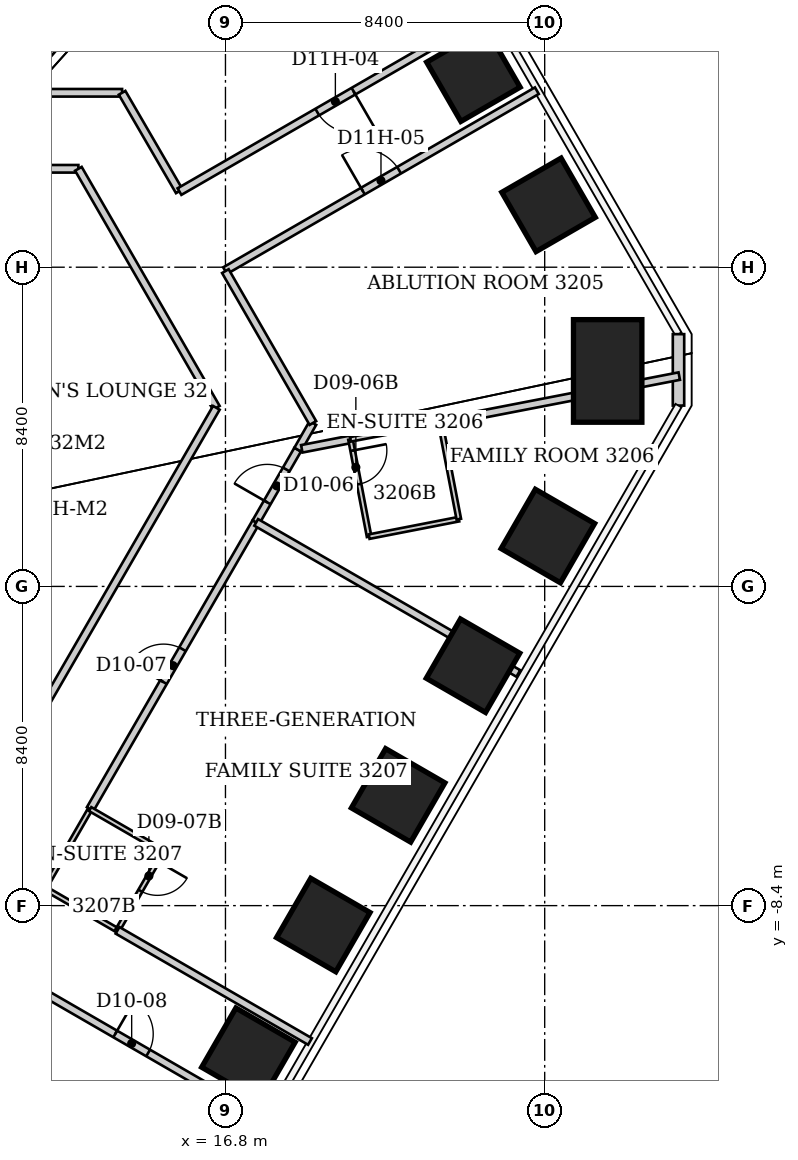
"""IFC4 building model, lengths in metres.
Left out: names, types, materials, properties, quantities, classifications, styles, units other than length and angle.
Written with IfcOpenShell. Run it as: python <this file> out.ifc"""

import sys

from ifc_helpers import new_model, si_unit, direction, frame, frame_2d, origin, origin_2d, place, context, subcontext, project, spatial, rectangle, extrude, element, fill, save


model = new_model("IFC4")
c1 = context("Model", 3, precision=1e-05, world=origin(), true_north=direction((0.0, 1.0)))
c2 = subcontext(c1, "Body", "Model", "MODEL_VIEW")
j1 = project(units=[si_unit("LENGTHUNIT", "METRE"), si_unit("PLANEANGLEUNIT", "RADIAN")], contexts=[c1])
p1 = place(None, origin())
s1 = spatial("IfcSite", under=j1, at=p1, CompositionType="ELEMENT")
p2 = place(p1, origin())
s2 = spatial("IfcBuilding", under=s1, at=p2, CompositionType="ELEMENT")
p3 = place(p2, frame((0.0, 0.0, 131.0)))
s3 = spatial("IfcBuildingStorey", under=s2, at=p3, CompositionType="ELEMENT", Elevation=131.0)
for number, where, z_axis, x_axis in (
    (1, (23.324, 13.466, 0.0), (0.0, 0.0, 1.0), (0.866, 0.5, 0.0)),
    (2, (25.302, 10.041, 0.0), (0.0, 0.0, 1.0), (0.866, 0.5, 0.0)),
):
    element("IfcColumn", number, at=place(p3, frame(where, z_axis=z_axis, x_axis=x_axis)), inside=s3, PredefinedType="COLUMN", context=c2, shape_type="SweptSolid", body=[
        extrude(rectangle(XDim=1.8, YDim=1.8, at=origin_2d()), origin(), (0.0, 0.0, 1.0), 3.8),
    ])
p4 = place(p3, frame((26.857, 5.67, 0.0), z_axis=(0.0, 0.0, 1.0), x_axis=(1.0, 0.0, 0.0)))
e3 = element("IfcColumn", 3, at=p4, inside=s3, PredefinedType="COLUMN", context=c2, shape_type="SweptSolid", body=[
    extrude(rectangle(XDim=1.8, YDim=2.7, at=origin_2d()), origin(), (0.0, 0.0, 1.0), 3.8),
])
for number, where, z_axis, x_axis in (
    (4, (25.284, 1.325, 0.0), (0.0, 0.0, 1.0), (0.866, -0.5, 0.0)),
    (5, (23.314, -2.087, 0.0), (0.0, 0.0, 1.0), (0.866, -0.5, 0.0)),
    (6, (21.344, -5.499, 0.0), (0.0, 0.0, 1.0), (0.866, -0.5, 0.0)),
    (7, (19.374, -8.911, 0.0), (0.0, 0.0, 1.0), (0.866, -0.5, 0.0)),
    (8, (17.404, -12.323, 0.0), (0.0, 0.0, 1.0), (0.866, -0.5, 0.0)),
):
    element("IfcColumn", number, at=place(p3, frame(where, z_axis=z_axis, x_axis=x_axis)), inside=s3, PredefinedType="COLUMN", context=c2, shape_type="SweptSolid", body=[
        extrude(rectangle(XDim=1.8, YDim=1.8, at=origin_2d()), origin(), (0.0, 0.0, 1.0), 3.8),
    ])
p5 = place(p3, frame((28.721, 6.638, 0.0), z_axis=(0.0, 0.0, 1.0), x_axis=(0.0, -1.0, 0.0)))
e9 = element("IfcWall", 9, at=p5, inside=s3, PredefinedType="SOLIDWALL", context=c2, shape_type="SweptSolid", body=[
    extrude(rectangle(XDim=1.88, YDim=0.3, at=frame_2d((0.94, 0.0))), origin(), (0.0, 0.0, 1.0), 3.64),
])
p6 = place(p3, frame((0.15, 10.99, 0.0), z_axis=(0.0, 0.0, 1.0), x_axis=(1.0, 0.0, 0.0)))
e10 = element("IfcWall", 10, at=p6, inside=s3, PredefinedType="PARTITIONING", context=c2, shape_type="SweptSolid", body=[
    extrude(rectangle(XDim=12.78, YDim=0.2, at=frame_2d((6.39, 0.0))), origin(), (0.0, 0.0, 1.0), 3.64),
])
p7 = place(p3, frame((10.84, -10.01, 0.0), z_axis=(0.0, 0.0, 1.0), x_axis=(0.86587701925, -0.500256921525, 0.0)))
e11 = element("IfcWall", 11, at=p7, inside=s3, PredefinedType="PARTITIONING", context=c2, shape_type="SweptSolid", body=[
    extrude(rectangle(XDim=8.066, YDim=0.2, at=frame_2d((4.033, 0.0))), origin(), (0.0, 0.0, 1.0), 3.64),
])
p8 = place(p7, frame((3.533, 0.0, 0.0)))
e12 = element("IfcOpeningElement", 12, at=p8, cuts=e11, PredefinedType="OPENING", context=c2, shape_type="SweptSolid", body=[
    extrude(rectangle(XDim=1.0, YDim=2.13, at=frame_2d((0.5, 1.065))), frame((0.0, 0.1, 0.0), z_axis=(0.0, -1.0, 0.0), x_axis=(1.0, 0.0, 0.0)), (0.0, 0.0, 1.0), 0.2),
])
p9 = place(p3, frame((12.04, -7.94, 0.0), z_axis=(0.0, 0.0, 1.0), x_axis=(0.499737123639, 0.866177122335, 0.0)))
e13 = element("IfcWall", 13, at=p9, inside=s3, PredefinedType="PARTITIONING", context=c2, shape_type="SweptSolid", body=[
    extrude(rectangle(XDim=2.401, YDim=0.12, at=frame_2d((1.201, 0.0))), origin(), (0.0, 0.0, 1.0), 3.64),
])
p10 = place(p3, frame((12.04, -7.94, 0.0), z_axis=(0.0, 0.0, 1.0), x_axis=(0.865705017107, -0.500554515868, 0.0)))
e14 = element("IfcWall", 14, at=p10, inside=s3, PredefinedType="PARTITIONING", context=c2, shape_type="SweptSolid", body=[
    extrude(rectangle(XDim=2.218, YDim=0.12, at=frame_2d((1.109, 0.0))), origin(), (0.0, 0.0, 1.0), 3.64),
])
p11 = place(p3, frame((12.93, 10.99, 0.0), z_axis=(0.0, 0.0, 1.0), x_axis=(0.4998524389, -0.866110581465, 0.0)))
e15 = element("IfcWall", 15, at=p11, inside=s3, PredefinedType="PARTITIONING", context=c2, shape_type="SweptSolid", body=[
    extrude(rectangle(XDim=7.262, YDim=0.2, at=frame_2d((3.631, 0.0))), origin(), (0.0, 0.0, 1.0), 3.64),
])
p12 = place(p3, frame((13.24, -5.86, 0.0), z_axis=(0.0, 0.0, 1.0), x_axis=(0.500093306236, 0.865971526701, 0.0)))
e16 = element("IfcWall", 16, at=p12, inside=s3, PredefinedType="PARTITIONING", context=c2, shape_type="SweptSolid", body=[
    extrude(rectangle(XDim=8.719, YDim=0.2, at=frame_2d((4.359, 0.0))), origin(), (0.0, 0.0, 1.0), 3.64),
])
p13 = place(p12, frame((3.859, 0.0, 0.0)))
e17 = element("IfcOpeningElement", 17, at=p13, cuts=e16, PredefinedType="OPENING", context=c2, shape_type="SweptSolid", body=[
    extrude(rectangle(XDim=1.0, YDim=2.13, at=frame_2d((0.5, 1.065))), frame((0.0, 0.1, 0.0), z_axis=(0.0, -1.0, 0.0), x_axis=(1.0, 0.0, 0.0)), (0.0, 0.0, 1.0), 0.2),
])
p14 = place(p3, frame((13.96, -9.05, 0.0), z_axis=(0.0, 0.0, 1.0), x_axis=(0.499693115345, 0.866202511239, 0.0)))
e18 = element("IfcWall", 18, at=p14, inside=s3, PredefinedType="PARTITIONING", context=c2, shape_type="SweptSolid", body=[
    extrude(rectangle(XDim=2.401, YDim=0.12, at=frame_2d((1.201, 0.0))), origin(), (0.0, 0.0, 1.0), 3.64),
])
p15 = place(p14, frame((1.201, 0.0, 0.0)))
e19 = element("IfcOpeningElement", 19, at=p15, cuts=e18, PredefinedType="OPENING", context=c2, shape_type="SweptSolid", body=[
    extrude(rectangle(XDim=0.9, YDim=2.03, at=frame_2d((0.45, 1.015))), frame((0.0, 0.06, 0.0), z_axis=(0.0, -1.0, 0.0), x_axis=(1.0, 0.0, 0.0)), (0.0, 0.0, 1.0), 0.12),
])
p16 = place(p3, frame((13.96, -9.05, 0.0), z_axis=(0.0, 0.0, 1.0), x_axis=(0.865934584664, -0.500157270349, 0.0)))
e20 = element("IfcWall", 20, at=p16, inside=s3, PredefinedType="PARTITIONING", context=c2, shape_type="SweptSolid", body=[
    extrude(rectangle(XDim=5.848, YDim=0.2, at=frame_2d((2.924, 0.0))), origin(), (0.0, 0.0, 1.0), 3.64),
])
p17 = place(p3, frame((14.08, 12.99, 0.0), z_axis=(0.0, 0.0, 1.0), x_axis=(-1.0, 0.0, 0.0)))
e21 = element("IfcWall", 21, at=p17, inside=s3, PredefinedType="PARTITIONING", context=c2, shape_type="SweptSolid", body=[
    extrude(rectangle(XDim=2.83, YDim=0.2, at=frame_2d((1.415, 0.0))), origin(), (0.0, 0.0, 1.0), 3.64),
])
p18 = place(p3, frame((15.16, -6.97, 0.0), z_axis=(0.0, 0.0, 1.0), x_axis=(-0.865705017107, 0.500554515868, 0.0)))
e22 = element("IfcWall", 22, at=p18, inside=s3, PredefinedType="PARTITIONING", context=c2, shape_type="SweptSolid", body=[
    extrude(rectangle(XDim=2.218, YDim=0.12, at=frame_2d((1.109, 0.0))), origin(), (0.0, 0.0, 1.0), 3.64),
])
p19 = place(p3, frame((15.585, 10.399, 0.0), z_axis=(0.0, 0.0, 1.0), x_axis=(-0.502198411801, 0.864752424214, 0.0)))
e23 = element("IfcWall", 23, at=p19, inside=s3, PredefinedType="PARTITIONING", context=c2, shape_type="SweptSolid", body=[
    extrude(rectangle(XDim=2.997, YDim=0.2, at=frame_2d((1.498, 0.0))), origin(), (0.0, 0.0, 1.0), 3.64),
])
p20 = place(p3, frame((16.56, 4.7, 0.0), z_axis=(0.0, 0.0, 1.0), x_axis=(-0.500007375767, -0.866021145342, 0.0)))
e24 = element("IfcWall", 24, at=p20, inside=s3, PredefinedType="PARTITIONING", context=c2, shape_type="SweptSolid", body=[
    extrude(rectangle(XDim=11.2, YDim=0.2, at=frame_2d((5.6, 0.0))), origin(), (0.0, 0.0, 1.0), 3.64),
])
p21 = place(p3, frame((16.79, 8.31, 0.0), z_axis=(0.0, 0.0, 1.0), x_axis=(0.866106622958, 0.499859297871, 0.0)))
e25 = element("IfcWall", 25, at=p21, inside=s3, PredefinedType="PARTITIONING", context=c2, shape_type="SweptSolid", body=[
    extrude(rectangle(XDim=9.472, YDim=0.2, at=frame_2d((4.736, 0.0))), origin(), (0.0, 0.0, 1.0), 3.64),
])
p22 = place(p21, frame((4.186, 0.0, 0.0)))
e26 = element("IfcOpeningElement", 26, at=p22, cuts=e25, PredefinedType="OPENING", context=c2, shape_type="SweptSolid", body=[
    extrude(rectangle(XDim=1.1, YDim=2.2, at=frame_2d((0.55, 1.1))), frame((0.0, 0.1, 0.0), z_axis=(0.0, -1.0, 0.0), x_axis=(1.0, 0.0, 0.0)), (0.0, 0.0, 1.0), 0.2),
])
p23 = place(p3, frame((17.6, 1.69, 0.0), z_axis=(0.0, 0.0, 1.0), x_axis=(0.498987132006, 0.866609394187, 0.0)))
e27 = element("IfcWall", 27, at=p23, inside=s3, PredefinedType="PARTITIONING", context=c2, shape_type="SweptSolid", body=[
    extrude(rectangle(XDim=2.204, YDim=0.2, at=frame_2d((1.102, 0.0))), origin(), (0.0, 0.0, 1.0), 3.64),
])
p24 = place(p23, frame((0.602, 0.0, 0.0)))
e28 = element("IfcOpeningElement", 28, at=p24, cuts=e27, PredefinedType="OPENING", context=c2, shape_type="SweptSolid", body=[
    extrude(rectangle(XDim=1.0, YDim=2.13, at=frame_2d((0.5, 1.065))), frame((0.0, 0.1, 0.0), z_axis=(0.0, -1.0, 0.0), x_axis=(1.0, 0.0, 0.0)), (0.0, 0.0, 1.0), 0.2),
])
p25 = place(p3, frame((18.7, 3.6, 0.0), z_axis=(0.0, 0.0, 1.0), x_axis=(0.496301979961, 0.868149955185, 0.0)))
e29 = element("IfcWall", 29, at=p25, inside=s3, PredefinedType="PARTITIONING", context=c2, shape_type="SweptSolid", body=[
    extrude(rectangle(XDim=0.806, YDim=0.2, at=frame_2d((0.403, 0.0))), origin(), (0.0, 0.0, 1.0), 3.64),
])
p26 = place(p3, frame((18.808, 3.621, 0.0), z_axis=(0.0, 0.0, 1.0), x_axis=(0.981658166981, 0.190649529764, 0.0)))
e30 = element("IfcWall", 30, at=p26, inside=s3, PredefinedType="PARTITIONING", context=c2, shape_type="SweptSolid", body=[
    extrude(rectangle(XDim=1.306, YDim=0.2, at=frame_2d((0.653, 0.0))), origin(), (0.0, 0.0, 1.0), 3.64),
])
p27 = place(p3, frame((19.1, 4.3, 0.0), z_axis=(0.0, 0.0, 1.0), x_axis=(-0.499190874865, 0.866492048695, 0.0)))
e31 = element("IfcWall", 31, at=p27, inside=s3, PredefinedType="PARTITIONING", context=c2, shape_type="SweptSolid", body=[
    extrude(rectangle(XDim=4.613, YDim=0.2, at=frame_2d((2.307, 0.0))), origin(), (0.0, 0.0, 1.0), 3.64),
])
p28 = place(p3, frame((19.16, 22.127, 0.0), z_axis=(0.0, 0.0, 1.0), x_axis=(-0.654528846076, -0.756037029288, 0.0)))
e32 = element("IfcWall", 32, at=p28, inside=s3, PredefinedType="PARTITIONING", context=c2, shape_type="SweptSolid", body=[
    extrude(rectangle(XDim=11.966, YDim=0.2, at=frame_2d((5.983, 0.0))), origin(), (0.0, 0.0, 1.0), 3.64),
])
p29 = place(p3, frame((20.09, 3.87, 0.0), z_axis=(0.0, 0.0, 1.0), x_axis=(0.187985762814, -0.982171753299, 0.0)))
e33 = element("IfcWall", 33, at=p29, inside=s3, PredefinedType="PARTITIONING", context=c2, shape_type="SweptSolid", body=[
    extrude(rectangle(XDim=2.606, YDim=0.12, at=frame_2d((1.303, 0.0))), origin(), (0.0, 0.0, 1.0), 3.64),
])
p30 = place(p29, frame((0.3, 0.0, 0.0)))
e34 = element("IfcOpeningElement", 34, at=p30, cuts=e33, PredefinedType="OPENING", context=c2, shape_type="SweptSolid", body=[
    extrude(rectangle(XDim=0.9, YDim=2.03, at=frame_2d((0.45, 1.015))), frame((0.0, 0.06, 0.0), z_axis=(0.0, -1.0, 0.0), x_axis=(1.0, 0.0, 0.0)), (0.0, 0.0, 1.0), 0.12),
])
p31 = place(p3, frame((20.09, 3.87, 0.0), z_axis=(0.0, 0.0, 1.0), x_axis=(0.982478825295, 0.186374241373, 0.0)))
e35 = element("IfcWall", 35, at=p31, inside=s3, PredefinedType="PARTITIONING", context=c2, shape_type="SweptSolid", body=[
    extrude(rectangle(XDim=2.402, YDim=0.12, at=frame_2d((1.201, 0.0))), origin(), (0.0, 0.0, 1.0), 3.64),
])
p32 = place(p3, frame((20.58, 1.31, 0.0), z_axis=(0.0, 0.0, 1.0), x_axis=(0.981529676402, 0.191309943135, 0.0)))
e36 = element("IfcWall", 36, at=p32, inside=s3, PredefinedType="PARTITIONING", context=c2, shape_type="SweptSolid", body=[
    extrude(rectangle(XDim=2.404, YDim=0.12, at=frame_2d((1.202, 0.0))), origin(), (0.0, 0.0, 1.0), 3.64),
])
p33 = place(p3, frame((22.45, 4.318, 0.0), z_axis=(0.0, 0.0, 1.0), x_axis=(0.981805297839, 0.189890381894, 0.0)))
e37 = element("IfcWall", 37, at=p33, inside=s3, PredefinedType="PARTITIONING", context=c2, shape_type="SweptSolid", body=[
    extrude(rectangle(XDim=6.406, YDim=0.2, at=frame_2d((3.203, 0.0))), origin(), (0.0, 0.0, 1.0), 3.64),
])
p34 = place(p3, frame((22.94, 1.77, 0.0), z_axis=(0.0, 0.0, 1.0), x_axis=(-0.188697442844, 0.982035271802, 0.0)))
e38 = element("IfcWall", 38, at=p34, inside=s3, PredefinedType="PARTITIONING", context=c2, shape_type="SweptSolid", body=[
    extrude(rectangle(XDim=2.597, YDim=0.12, at=frame_2d((1.298, 0.0))), origin(), (0.0, 0.0, 1.0), 3.64),
])
p35 = place(p3, frame((23.794, 15.125, 0.0), z_axis=(0.0, 0.0, 1.0), x_axis=(-0.866089024064, -0.499889790249, 0.0)))
e39 = element("IfcWall", 39, at=p35, inside=s3, PredefinedType="PARTITIONING", context=c2, shape_type="SweptSolid", body=[
    extrude(rectangle(XDim=9.472, YDim=0.2, at=frame_2d((4.736, 0.0))), origin(), (0.0, 0.0, 1.0), 3.64),
])
p36 = place(p35, frame((4.186, 0.0, 0.0)))
e40 = element("IfcOpeningElement", 40, at=p36, cuts=e39, PredefinedType="OPENING", context=c2, shape_type="SweptSolid", body=[
    extrude(rectangle(XDim=1.1, YDim=2.2, at=frame_2d((0.55, 1.1))), frame((0.0, 0.1, 0.0), z_axis=(0.0, -1.0, 0.0), x_axis=(1.0, 0.0, 0.0)), (0.0, 0.0, 1.0), 0.2),
])
p37 = place(p3, frame((24.506, -2.29, 0.0), z_axis=(0.0, 0.0, 1.0), x_axis=(-0.866414224119, 0.499325937884, 0.0)))
e41 = element("IfcWall", 41, at=p37, inside=s3, PredefinedType="PARTITIONING", context=c2, shape_type="SweptSolid", body=[
    extrude(rectangle(XDim=7.961, YDim=0.2, at=frame_2d((3.98, 0.0))), origin(), (0.0, 0.0, 1.0), 3.64),
])
p38 = place(p36, origin())
e42 = element("IfcDoor", 42, at=p38, inside=s3, OperationType="SINGLE_SWING_LEFT", PredefinedType="DOOR", context=c2, shape_type="SweptSolid", body=[
    extrude(rectangle(XDim=1.1, YDim=2.2, at=frame_2d((0.55, 1.1))), frame((0.0, 0.025, 0.0), z_axis=(0.0, -1.0, 0.0), x_axis=(1.0, 0.0, 0.0)), (0.0, 0.0, 1.0), 0.05),
])
fill(e40, e42)
p39 = place(p22, origin())
e43 = element("IfcDoor", 43, at=p39, inside=s3, OperationType="SINGLE_SWING_LEFT", PredefinedType="DOOR", context=c2, shape_type="SweptSolid", body=[
    extrude(rectangle(XDim=1.1, YDim=2.2, at=frame_2d((0.55, 1.1))), frame((0.0, 0.025, 0.0), z_axis=(0.0, -1.0, 0.0), x_axis=(1.0, 0.0, 0.0)), (0.0, 0.0, 1.0), 0.05),
])
fill(e26, e43)
p40 = place(p24, origin())
e44 = element("IfcDoor", 44, at=p40, inside=s3, OperationType="SINGLE_SWING_LEFT", PredefinedType="DOOR", context=c2, shape_type="SweptSolid", body=[
    extrude(rectangle(XDim=1.0, YDim=2.13, at=frame_2d((0.5, 1.065))), frame((0.0, 0.025, 0.0), z_axis=(0.0, -1.0, 0.0), x_axis=(1.0, 0.0, 0.0)), (0.0, 0.0, 1.0), 0.05),
])
fill(e28, e44)
p41 = place(p30, origin())
e45 = element("IfcDoor", 45, at=p41, inside=s3, OperationType="SINGLE_SWING_LEFT", PredefinedType="DOOR", context=c2, shape_type="SweptSolid", body=[
    extrude(rectangle(XDim=0.9, YDim=2.03, at=frame_2d((0.45, 1.015))), frame((0.0, 0.025, 0.0), z_axis=(0.0, -1.0, 0.0), x_axis=(1.0, 0.0, 0.0)), (0.0, 0.0, 1.0), 0.05),
])
fill(e34, e45)
p42 = place(p13, origin())
e46 = element("IfcDoor", 46, at=p42, inside=s3, OperationType="SINGLE_SWING_LEFT", PredefinedType="DOOR", context=c2, shape_type="SweptSolid", body=[
    extrude(rectangle(XDim=1.0, YDim=2.13, at=frame_2d((0.5, 1.065))), frame((0.0, 0.025, 0.0), z_axis=(0.0, -1.0, 0.0), x_axis=(1.0, 0.0, 0.0)), (0.0, 0.0, 1.0), 0.05),
])
fill(e17, e46)
p43 = place(p15, origin())
e47 = element("IfcDoor", 47, at=p43, inside=s3, OperationType="SINGLE_SWING_RIGHT", PredefinedType="DOOR", context=c2, shape_type="SweptSolid", body=[
    extrude(rectangle(XDim=0.9, YDim=2.03, at=frame_2d((0.45, 1.015))), frame((0.0, 0.025, 0.0), z_axis=(0.0, -1.0, 0.0), x_axis=(1.0, 0.0, 0.0)), (0.0, 0.0, 1.0), 0.05),
])
fill(e19, e47)
p44 = place(p8, origin())
e48 = element("IfcDoor", 48, at=p44, inside=s3, OperationType="SINGLE_SWING_LEFT", PredefinedType="DOOR", context=c2, shape_type="SweptSolid", body=[
    extrude(rectangle(XDim=1.0, YDim=2.13, at=frame_2d((0.5, 1.065))), frame((0.0, 0.025, 0.0), z_axis=(0.0, -1.0, 0.0), x_axis=(1.0, 0.0, 0.0)), (0.0, 0.0, 1.0), 0.05),
])
fill(e12, e48)
save(model, sys.argv[1])
